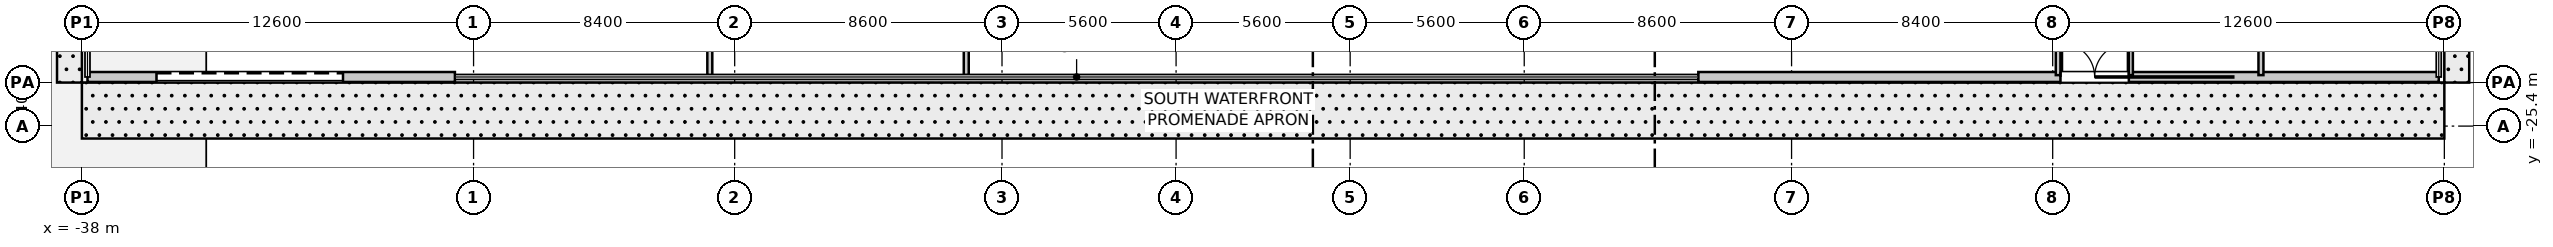
"""IFC4 building model, lengths in metres.
Left out: names, types, materials, properties, quantities, classifications, styles, units other than length and angle.
Written with IfcOpenShell. Run it as: python <this file> out.ifc"""

import sys

from ifc_helpers import new_model, si_unit, direction, frame, frame_2d, origin, place, context, subcontext, project, spatial, rectangle, extrude, source, transform, mapped, element, fill, save


model = new_model("IFC4")
c1 = context("Model", 3, precision=1e-05, world=origin(), true_north=direction((0.0, 1.0)))
c2 = subcontext(c1, "Body", "Model", "MODEL_VIEW")
j1 = project(units=[si_unit("LENGTHUNIT", "METRE"), si_unit("PLANEANGLEUNIT", "RADIAN")], contexts=[c1])
p1 = place(None, origin())
s1 = spatial("IfcSite", under=j1, at=p1, CompositionType="ELEMENT")
p2 = place(p1, origin())
s2 = spatial("IfcBuilding", under=s1, at=p2, CompositionType="ELEMENT")
p3 = place(p2, origin())
s3 = spatial("IfcBuildingStorey", under=s2, at=p3, CompositionType="ELEMENT", Elevation=0.0)
m1 = source(origin(), c2, "Body", "SweptSolid", [
    extrude(rectangle(XDim=11.82, YDim=0.32, at=frame_2d((5.91, 0.0))), origin(), (0.0, 0.0, 1.0), 5.08),
])
p4 = place(p3, frame((-37.82, -23.82, 0.0), z_axis=(0.0, 0.0, 1.0), x_axis=(1.0, 0.0, 0.0)))
e1 = element("IfcWall", 1, at=p4, inside=s3, PredefinedType="STANDARD", context=c2, shape_type="MappedRepresentation", body=[
    mapped(m1, transform((0.0, 0.0, 0.0), scale=1.0)),
])
p5 = place(p4, frame((2.22, 0.0, 0.0)))
e2 = element("IfcOpeningElement", 2, at=p5, cuts=e1, PredefinedType="OPENING", context=c2, shape_type="SweptSolid", body=[
    extrude(rectangle(XDim=6.0, YDim=3.4, at=frame_2d((3.0, 1.7))), frame((0.0, 0.17, 0.0), z_axis=(0.0, -1.0, 0.0), x_axis=(1.0, 0.0, 0.0)), (0.0, 0.0, 1.0), 0.34),
])
m2 = source(origin(), c2, "Body", "SweptSolid", [
    extrude(rectangle(XDim=23.82, YDim=0.32, at=frame_2d((11.91, 0.0))), origin(), (0.0, 0.0, 1.0), 5.08),
])
p6 = place(p3, frame((14.0, -23.82, 0.0), z_axis=(0.0, 0.0, 1.0), x_axis=(1.0, 0.0, 0.0)))
e3 = element("IfcWall", 3, at=p6, inside=s3, PredefinedType="STANDARD", context=c2, shape_type="MappedRepresentation", body=[
    mapped(m2, transform((0.0, 0.0, 0.0), scale=1.0)),
])
p7 = place(p6, frame((11.65, 0.0, 0.0)))
e4 = element("IfcOpeningElement", 4, at=p7, cuts=e3, PredefinedType="OPENING", context=c2, shape_type="SweptSolid", body=[
    extrude(rectangle(XDim=2.2, YDim=2.6, at=frame_2d((1.1, 1.3))), frame((0.0, 0.17, 0.0), z_axis=(0.0, -1.0, 0.0), x_axis=(1.0, 0.0, 0.0)), (0.0, 0.0, 1.0), 0.34),
])
m3 = source(origin(), c2, "Body", "SweptSolid", [
    extrude(rectangle(XDim=19.21, YDim=0.2, at=frame_2d((9.605, 0.0))), origin(), (0.0, 0.0, 1.0), 3.4),
])
p8 = place(p3, frame((25.6, -23.76, 0.0), z_axis=(0.0, 0.0, 1.0), x_axis=(0.0, 1.0, 0.0)))
e5 = element("IfcWall", 5, at=p8, inside=s3, PredefinedType="PARTITIONING", context=c2, shape_type="MappedRepresentation", body=[
    mapped(m3, transform((0.0, 0.0, 0.0), scale=1.0)),
])
m4 = source(origin(), c2, "Body", "SweptSolid", [
    extrude(rectangle(XDim=19.21, YDim=0.16, at=frame_2d((9.605, 0.0))), origin(), (0.0, 0.0, 1.0), 3.4),
])
for number, where, z_axis, x_axis in (
    (6, (-17.8, -23.76, 0.0), (0.0, 0.0, 1.0), (0.0, 1.0, 0.0)),
    (7, (-9.55, -23.76, 0.0), (0.0, 0.0, 1.0), (0.0, 1.0, 0.0)),
):
    element("IfcWall", number, at=place(p3, frame(where, z_axis=z_axis, x_axis=x_axis)), inside=s3, PredefinedType="PARTITIONING", context=c2, shape_type="MappedRepresentation", body=[
        mapped(m4, transform((0.0, 0.0, 0.0), scale=1.0)),
    ])
p9 = place(p3, frame((27.9, -23.76, 0.0), z_axis=(0.0, 0.0, 1.0), x_axis=(0.0, 1.0, 0.0)))
e8 = element("IfcWall", 8, at=p9, inside=s3, PredefinedType="PARTITIONING", context=c2, shape_type="MappedRepresentation", body=[
    mapped(m4, transform((0.0, 0.0, 0.0), scale=1.0)),
])
p10 = place(p9, frame((12.439, 0.0, 0.0)))
e9 = element("IfcOpeningElement", 9, at=p10, cuts=e8, PredefinedType="OPENING", context=c2, shape_type="SweptSolid", body=[
    extrude(rectangle(XDim=0.98, YDim=2.1, at=frame_2d((0.49, 1.05))), frame((0.0, 0.09, 0.0), z_axis=(0.0, -1.0, 0.0), x_axis=(1.0, 0.0, 0.0)), (0.0, 0.0, 1.0), 0.18),
])
p11 = place(p3, frame((32.1, -23.76, 0.0), z_axis=(0.0, 0.0, 1.0), x_axis=(0.0, 1.0, 0.0)))
e10 = element("IfcWall", 10, at=p11, inside=s3, PredefinedType="PARTITIONING", context=c2, shape_type="MappedRepresentation", body=[
    mapped(m4, transform((0.0, 0.0, 0.0), scale=1.0)),
])
m5 = source(origin(), c2, "Body", "SweptSolid", [
    extrude(rectangle(XDim=6.0, YDim=3.4, at=frame_2d((3.0, 1.7))), frame((0.0, 0.025, 0.0), z_axis=(0.0, -1.0, 0.0), x_axis=(1.0, 0.0, 0.0)), (0.0, 0.0, 1.0), 0.05),
])
p12 = place(p5, frame((6.0, 0.0, 0.0), z_axis=(0.0, 0.0, 1.0), x_axis=(-1.0, 0.0, 0.0)))
e11 = element("IfcDoor", 11, at=p12, inside=s3, OperationType="ROLLINGUP", PredefinedType="GATE", context=c2, shape_type="MappedRepresentation", body=[
    mapped(m5, transform((0.0, 0.0, 0.0), scale=1.0)),
])
fill(e2, e11)
m6 = source(origin(), c2, "Body", "SweptSolid", [
    extrude(rectangle(XDim=2.2, YDim=2.6, at=frame_2d((1.1, 1.3))), frame((0.0, 0.025, 0.0), z_axis=(0.0, -1.0, 0.0), x_axis=(1.0, 0.0, 0.0)), (0.0, 0.0, 1.0), 0.05),
])
p13 = place(p7, frame((2.2, 0.0, 0.0), z_axis=(0.0, 0.0, 1.0), x_axis=(-1.0, 0.0, 0.0)))
e12 = element("IfcDoor", 12, at=p13, inside=s3, OperationType="DOUBLE_DOOR_SINGLE_SWING", PredefinedType="DOOR", context=c2, shape_type="MappedRepresentation", body=[
    mapped(m6, transform((0.0, 0.0, 0.0), scale=1.0)),
])
fill(e4, e12)
save(model, sys.argv[1])
